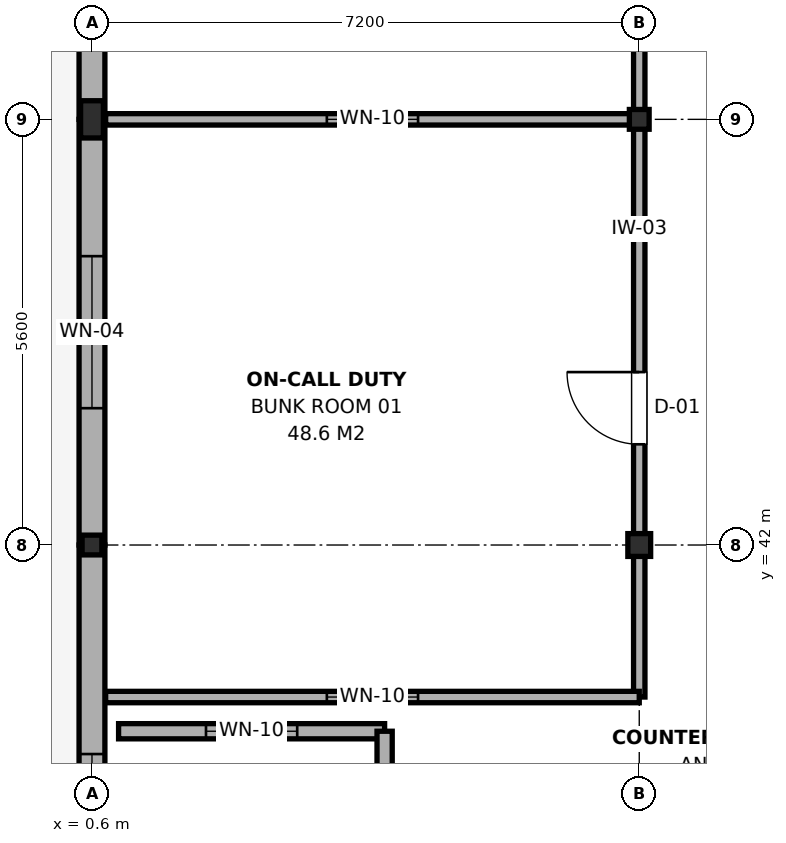
"""IFC4 building model, lengths in metres.
Left out: names, types, materials, properties, quantities, classifications, styles, units other than length and angle.
Written with IfcOpenShell. Run it as: python <this file> out.ifc"""

import sys

from ifc_helpers import new_model, si_unit, direction, frame, frame_2d, origin, origin_2d, place, context, subcontext, project, spatial, rectangle, i_section, extrude, element, fill, save


model = new_model("IFC4")
c1 = context("Model", 3, precision=1e-05, world=origin(), true_north=direction((0.0, 1.0)))
c2 = subcontext(c1, "Body", "Model", "MODEL_VIEW")
j1 = project(units=[si_unit("LENGTHUNIT", "METRE"), si_unit("PLANEANGLEUNIT", "RADIAN")], contexts=[c1])
p1 = place(None, origin())
s1 = spatial("IfcSite", under=j1, at=p1, CompositionType="ELEMENT")
p2 = place(p1, origin())
s2 = spatial("IfcBuilding", under=s1, at=p2, CompositionType="ELEMENT")
p3 = place(p2, frame((0.0, 0.0, 24.9)))
s3 = spatial("IfcBuildingStorey", under=s2, at=p3, CompositionType="ELEMENT", Elevation=24.9)
p4 = place(p3, frame((0.6, 42.0, 0.0), z_axis=(0.0, 0.0, 1.0), x_axis=(1.0, 0.0, 0.0)))
e1 = element("IfcColumn", 1, at=p4, inside=s3, PredefinedType="COLUMN", context=c2, shape_type="SweptSolid", body=[
    extrude(i_section(OverallWidth=0.26, OverallDepth=0.26, WebThickness=0.01, FlangeThickness=0.018, FilletRadius=0.024, at=origin_2d()), origin(), (0.0, 0.0, 1.0), 3.9),
])
p5 = place(p3, frame((0.6, 47.6, 0.0), z_axis=(0.0, 0.0, 1.0), x_axis=(1.0, 0.0, 0.0)))
e2 = element("IfcColumn", 2, at=p5, inside=s3, PredefinedType="COLUMN", context=c2, shape_type="SweptSolid", body=[
    extrude(i_section(OverallWidth=0.3, OverallDepth=0.49, WebThickness=0.012, FlangeThickness=0.023, FilletRadius=0.027, at=origin_2d()), origin(), (0.0, 0.0, 1.0), 3.9),
])
p6 = place(p3, frame((7.8, 42.0, 0.0), z_axis=(0.0, 0.0, 1.0), x_axis=(1.0, 0.0, 0.0)))
e3 = element("IfcColumn", 3, at=p6, inside=s3, PredefinedType="COLUMN", context=c2, shape_type="SweptSolid", body=[
    extrude(i_section(OverallWidth=0.3, OverallDepth=0.3, WebThickness=0.011, FlangeThickness=0.019, FilletRadius=0.027, at=origin_2d()), origin(), (0.0, 0.0, 1.0), 3.9),
])
p7 = place(p3, frame((7.8, 47.6, 0.0), z_axis=(0.0, 0.0, 1.0), x_axis=(1.0, 0.0, 0.0)))
e4 = element("IfcColumn", 4, at=p7, inside=s3, PredefinedType="COLUMN", context=c2, shape_type="SweptSolid", body=[
    extrude(i_section(OverallWidth=0.26, OverallDepth=0.26, WebThickness=0.01, FlangeThickness=0.018, FilletRadius=0.024, at=origin_2d()), origin(), (0.0, 0.0, 1.0), 3.9),
])
p8 = place(p3, frame((0.6, 36.4, 0.0), z_axis=(0.0, 0.0, 1.0), x_axis=(0.0, 1.0, 0.0)))
e5 = element("IfcWall", 5, at=p8, inside=s3, PredefinedType="SOLIDWALL", context=c2, shape_type="SweptSolid", body=[
    extrude(rectangle(XDim=5.6, YDim=0.34, at=frame_2d((2.8, 0.0))), origin(), (0.0, 0.0, 1.0), 3.215),
])
p9 = place(p8, frame((0.85, 0.0, 0.9)))
e6 = element("IfcOpeningElement", 6, at=p9, cuts=e5, PredefinedType="OPENING", context=c2, shape_type="SweptSolid", body=[
    extrude(rectangle(XDim=2.0, YDim=1.8, at=frame_2d((1.0, 0.9))), frame((0.0, 0.185, 0.0), z_axis=(0.0, -1.0, 0.0), x_axis=(1.0, 0.0, 0.0)), (0.0, 0.0, 1.0), 0.37),
])
p10 = place(p3, frame((0.6, 42.0, 0.0), z_axis=(0.0, 0.0, 1.0), x_axis=(0.0, 1.0, 0.0)))
e7 = element("IfcWall", 7, at=p10, inside=s3, PredefinedType="SOLIDWALL", context=c2, shape_type="SweptSolid", body=[
    extrude(rectangle(XDim=5.6, YDim=0.34, at=frame_2d((2.8, 0.0))), origin(), (0.0, 0.0, 1.0), 3.265),
])
p11 = place(p10, frame((1.8, 0.0, 0.9)))
e8 = element("IfcOpeningElement", 8, at=p11, cuts=e7, PredefinedType="OPENING", context=c2, shape_type="SweptSolid", body=[
    extrude(rectangle(XDim=2.0, YDim=1.8, at=frame_2d((1.0, 0.9))), frame((0.0, 0.185, 0.0), z_axis=(0.0, -1.0, 0.0), x_axis=(1.0, 0.0, 0.0)), (0.0, 0.0, 1.0), 0.37),
])
p12 = place(p3, frame((0.6, 47.6, 0.0), z_axis=(0.0, 0.0, 1.0), x_axis=(0.0, 1.0, 0.0)))
e9 = element("IfcWall", 9, at=p12, inside=s3, PredefinedType="SOLIDWALL", context=c2, shape_type="SweptSolid", body=[
    extrude(rectangle(XDim=5.6, YDim=0.34, at=frame_2d((2.8, 0.0))), origin(), (0.0, 0.0, 1.0), 3.115),
])
p13 = place(p12, frame((1.8, 0.0, 0.9)))
e10 = element("IfcOpeningElement", 10, at=p13, cuts=e9, PredefinedType="OPENING", context=c2, shape_type="SweptSolid", body=[
    extrude(rectangle(XDim=2.0, YDim=1.8, at=frame_2d((1.0, 0.9))), frame((0.0, 0.185, 0.0), z_axis=(0.0, -1.0, 0.0), x_axis=(1.0, 0.0, 0.0)), (0.0, 0.0, 1.0), 0.37),
])
p14 = place(p3, frame((0.95, 39.55, 0.0), z_axis=(0.0, 0.0, 1.0), x_axis=(1.0, 0.0, 0.0)))
e11 = element("IfcWall", 11, at=p14, inside=s3, PredefinedType="PARTITIONING", context=c2, shape_type="SweptSolid", body=[
    extrude(rectangle(XDim=3.5, YDim=0.2, at=frame_2d((1.75, 0.0))), origin(), (0.0, 0.0, 1.0), 3.715),
])
p15 = place(p14, frame((1.15, 0.0, 0.95)))
e12 = element("IfcOpeningElement", 12, at=p15, cuts=e11, PredefinedType="OPENING", context=c2, shape_type="SweptSolid", body=[
    extrude(rectangle(XDim=1.2, YDim=1.5, at=frame_2d((0.6, 0.75))), frame((0.0, 0.115, 0.0), z_axis=(0.0, -1.0, 0.0), x_axis=(1.0, 0.0, 0.0)), (0.0, 0.0, 1.0), 0.23),
])
p16 = place(p3, frame((4.45, 36.15, 0.0), z_axis=(0.0, 0.0, 1.0), x_axis=(0.0, 1.0, 0.0)))
e13 = element("IfcWall", 13, at=p16, inside=s3, PredefinedType="PARTITIONING", context=c2, shape_type="SweptSolid", body=[
    extrude(rectangle(XDim=3.4, YDim=0.2, at=frame_2d((1.7, 0.0))), origin(), (0.0, 0.0, 1.0), 3.265),
])
p17 = place(p16, frame((1.15, 0.0, 0.0)))
e14 = element("IfcOpeningElement", 14, at=p17, cuts=e13, PredefinedType="OPENING", context=c2, shape_type="SweptSolid", body=[
    extrude(rectangle(XDim=1.1, YDim=2.15, at=frame_2d((0.55, 1.075))), frame((0.0, 0.115, 0.0), z_axis=(0.0, -1.0, 0.0), x_axis=(1.0, 0.0, 0.0)), (0.0, 0.0, 1.0), 0.23),
])
p18 = place(p3, frame((7.8, 40.0, 0.0), z_axis=(0.0, 0.0, 1.0), x_axis=(0.0, 1.0, 0.0)))
e15 = element("IfcWall", 15, at=p18, inside=s3, PredefinedType="PARTITIONING", context=c2, shape_type="SweptSolid", body=[
    extrude(rectangle(XDim=7.6, YDim=0.15, at=frame_2d((3.8, 0.0))), origin(), (0.0, 0.0, 1.0), 3.115),
])
p19 = place(p18, frame((3.325, 0.0, 0.0)))
e16 = element("IfcOpeningElement", 16, at=p19, cuts=e15, PredefinedType="OPENING", context=c2, shape_type="SweptSolid", body=[
    extrude(rectangle(XDim=0.95, YDim=2.15, at=frame_2d((0.475, 1.075))), frame((0.0, 0.09, 0.0), z_axis=(0.0, -1.0, 0.0), x_axis=(1.0, 0.0, 0.0)), (0.0, 0.0, 1.0), 0.18),
])
p20 = place(p3, frame((0.78, 40.0, 0.0), z_axis=(0.0, 0.0, 1.0), x_axis=(1.0, 0.0, 0.0)))
e17 = element("IfcWall", 17, at=p20, inside=s3, PredefinedType="PARTITIONING", context=c2, shape_type="SweptSolid", body=[
    extrude(rectangle(XDim=7.02, YDim=0.15, at=frame_2d((3.51, 0.0))), origin(), (0.0, 0.0, 1.0), 3.265),
])
p21 = place(p20, frame((2.91, 0.0, 0.95)))
e18 = element("IfcOpeningElement", 18, at=p21, cuts=e17, PredefinedType="OPENING", context=c2, shape_type="SweptSolid", body=[
    extrude(rectangle(XDim=1.2, YDim=1.5, at=frame_2d((0.6, 0.75))), frame((0.0, 0.09, 0.0), z_axis=(0.0, -1.0, 0.0), x_axis=(1.0, 0.0, 0.0)), (0.0, 0.0, 1.0), 0.18),
])
p22 = place(p3, frame((7.8, 47.6, 0.0), z_axis=(0.0, 0.0, 1.0), x_axis=(0.0, 1.0, 0.0)))
e19 = element("IfcWall", 19, at=p22, inside=s3, PredefinedType="PARTITIONING", context=c2, shape_type="SweptSolid", body=[
    extrude(rectangle(XDim=7.6, YDim=0.15, at=frame_2d((3.8, 0.0))), origin(), (0.0, 0.0, 1.0), 3.115),
])
p23 = place(p22, frame((3.325, 0.0, 0.0)))
e20 = element("IfcOpeningElement", 20, at=p23, cuts=e19, PredefinedType="OPENING", context=c2, shape_type="SweptSolid", body=[
    extrude(rectangle(XDim=0.95, YDim=2.15, at=frame_2d((0.475, 1.075))), frame((0.0, 0.09, 0.0), z_axis=(0.0, -1.0, 0.0), x_axis=(1.0, 0.0, 0.0)), (0.0, 0.0, 1.0), 0.18),
])
p24 = place(p3, frame((0.78, 47.6, 0.0), z_axis=(0.0, 0.0, 1.0), x_axis=(1.0, 0.0, 0.0)))
e21 = element("IfcWall", 21, at=p24, inside=s3, PredefinedType="PARTITIONING", context=c2, shape_type="SweptSolid", body=[
    extrude(rectangle(XDim=7.02, YDim=0.15, at=frame_2d((3.51, 0.0))), origin(), (0.0, 0.0, 1.0), 3.115),
])
p25 = place(p24, frame((2.91, 0.0, 0.95)))
e22 = element("IfcOpeningElement", 22, at=p25, cuts=e21, PredefinedType="OPENING", context=c2, shape_type="SweptSolid", body=[
    extrude(rectangle(XDim=1.2, YDim=1.5, at=frame_2d((0.6, 0.75))), frame((0.0, 0.09, 0.0), z_axis=(0.0, -1.0, 0.0), x_axis=(1.0, 0.0, 0.0)), (0.0, 0.0, 1.0), 0.18),
])
p26 = place(p9, origin())
e23 = element("IfcWindow", 23, at=p26, inside=s3, PartitioningType="SINGLE_PANEL", PredefinedType="WINDOW", context=c2, shape_type="SweptSolid", body=[
    extrude(rectangle(XDim=2.0, YDim=1.8, at=frame_2d((1.0, 0.9))), frame((0.0, 0.03, 0.0), z_axis=(0.0, -1.0, 0.0), x_axis=(1.0, 0.0, 0.0)), (0.0, 0.0, 1.0), 0.06),
])
fill(e6, e23)
p27 = place(p11, origin())
e24 = element("IfcWindow", 24, at=p27, inside=s3, PartitioningType="SINGLE_PANEL", PredefinedType="WINDOW", context=c2, shape_type="SweptSolid", body=[
    extrude(rectangle(XDim=2.0, YDim=1.8, at=frame_2d((1.0, 0.9))), frame((0.0, 0.03, 0.0), z_axis=(0.0, -1.0, 0.0), x_axis=(1.0, 0.0, 0.0)), (0.0, 0.0, 1.0), 0.06),
])
fill(e8, e24)
p28 = place(p15, origin())
e25 = element("IfcWindow", 25, at=p28, inside=s3, PartitioningType="SINGLE_PANEL", PredefinedType="WINDOW", context=c2, shape_type="SweptSolid", body=[
    extrude(rectangle(XDim=1.2, YDim=1.5, at=frame_2d((0.6, 0.75))), frame((0.0, 0.03, 0.0), z_axis=(0.0, -1.0, 0.0), x_axis=(1.0, 0.0, 0.0)), (0.0, 0.0, 1.0), 0.06),
])
fill(e12, e25)
p29 = place(p19, origin())
e26 = element("IfcDoor", 26, at=p29, inside=s3, OperationType="SINGLE_SWING_RIGHT", PredefinedType="DOOR", context=c2, shape_type="SweptSolid", body=[
    extrude(rectangle(XDim=0.95, YDim=2.15, at=frame_2d((0.475, 1.075))), frame((0.0, 0.025, 0.0), z_axis=(0.0, -1.0, 0.0), x_axis=(1.0, 0.0, 0.0)), (0.0, 0.0, 1.0), 0.05),
])
fill(e16, e26)
p30 = place(p21, origin())
e27 = element("IfcWindow", 27, at=p30, inside=s3, PartitioningType="SINGLE_PANEL", PredefinedType="WINDOW", context=c2, shape_type="SweptSolid", body=[
    extrude(rectangle(XDim=1.2, YDim=1.5, at=frame_2d((0.6, 0.75))), frame((0.0, 0.03, 0.0), z_axis=(0.0, -1.0, 0.0), x_axis=(1.0, 0.0, 0.0)), (0.0, 0.0, 1.0), 0.06),
])
fill(e18, e27)
p31 = place(p25, origin())
e28 = element("IfcWindow", 28, at=p31, inside=s3, PartitioningType="SINGLE_PANEL", PredefinedType="WINDOW", context=c2, shape_type="SweptSolid", body=[
    extrude(rectangle(XDim=1.2, YDim=1.5, at=frame_2d((0.6, 0.75))), frame((0.0, 0.03, 0.0), z_axis=(0.0, -1.0, 0.0), x_axis=(1.0, 0.0, 0.0)), (0.0, 0.0, 1.0), 0.06),
])
fill(e22, e28)
save(model, sys.argv[1])
